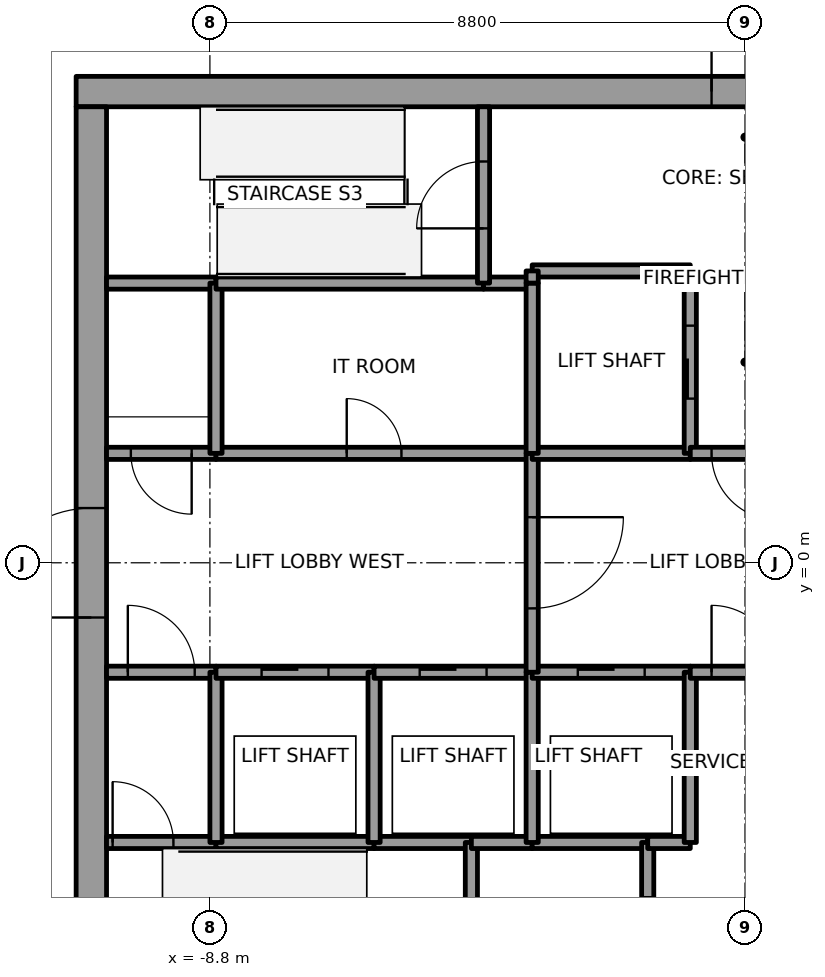
"""IFC4 building model, lengths in metres.
Left out: names, types, materials, properties, quantities, classifications, styles, units other than length and angle.
Written with IfcOpenShell. Run it as: python <this file> out.ifc"""

import sys

from ifc_helpers import new_model, si_unit, direction, frame, frame_2d, origin, place, context, subcontext, project, spatial, rectangle, extrude, element, fill, save


model = new_model("IFC4")
c1 = context("Model", 3, precision=1e-05, world=origin(), true_north=direction((0.0, 1.0)))
c2 = subcontext(c1, "Body", "Model", "MODEL_VIEW")
j1 = project(units=[si_unit("LENGTHUNIT", "METRE"), si_unit("PLANEANGLEUNIT", "RADIAN")], contexts=[c1])
p1 = place(None, origin())
s1 = spatial("IfcSite", under=j1, at=p1, CompositionType="ELEMENT")
p2 = place(p1, origin())
s2 = spatial("IfcBuilding", under=s1, at=p2, CompositionType="ELEMENT")
p3 = place(p2, frame((0.0, 0.0, 303.0)))
s3 = spatial("IfcBuildingStorey", under=s2, at=p3, CompositionType="ELEMENT", Elevation=303.0)
p4 = place(p3, frame((-11.0, 7.75, 0.0), z_axis=(0.0, 0.0, 1.0), x_axis=(1.0, 0.0, 0.0)))
e1 = element("IfcWall", 1, at=p4, inside=s3, PredefinedType="SHEAR", context=c2, shape_type="SweptSolid", body=[
    extrude(rectangle(XDim=22.0, YDim=0.5, at=frame_2d((11.0, 0.0))), origin(), (0.0, 0.0, 1.0), 4.0),
])
p5 = place(p4, frame((10.45, 0.0, 0.0)))
e2 = element("IfcOpeningElement", 2, at=p5, cuts=e1, PredefinedType="OPENING", context=c2, shape_type="SweptSolid", body=[
    extrude(rectangle(XDim=1.1, YDim=2.1, at=frame_2d((0.55, 1.05))), frame((0.0, 0.25, 0.0), z_axis=(0.0, -1.0, 0.0), x_axis=(1.0, 0.0, 0.0)), (0.0, 0.0, 1.0), 0.5),
])
p6 = place(p3, frame((-10.75, -7.5, 0.0), z_axis=(0.0, 0.0, 1.0), x_axis=(0.0, 1.0, 0.0)))
e3 = element("IfcWall", 3, at=p6, inside=s3, PredefinedType="SHEAR", context=c2, shape_type="SweptSolid", body=[
    extrude(rectangle(XDim=15.0, YDim=0.5, at=frame_2d((7.5, 0.0))), origin(), (0.0, 0.0, 1.0), 4.0),
])
p7 = place(p6, frame((6.6, 0.0, 0.0)))
e4 = element("IfcOpeningElement", 4, at=p7, cuts=e3, PredefinedType="OPENING", context=c2, shape_type="SweptSolid", body=[
    extrude(rectangle(XDim=1.8, YDim=2.1, at=frame_2d((0.9, 1.05))), frame((0.0, 0.25, 0.0), z_axis=(0.0, -1.0, 0.0), x_axis=(1.0, 0.0, 0.0)), (0.0, 0.0, 1.0), 0.5),
])
p8 = place(p3, frame((-10.5, -4.6, 0.0), z_axis=(0.0, 0.0, 1.0), x_axis=(1.0, 0.0, 0.0)))
e5 = element("IfcWall", 5, at=p8, inside=s3, PredefinedType="SOLIDWALL", context=c2, shape_type="SweptSolid", body=[
    extrude(rectangle(XDim=1.8, YDim=0.2, at=frame_2d((0.9, 0.0))), origin(), (0.0, 0.0, 1.0), 3.85),
])
p9 = place(p8, frame((0.1, 0.0, 0.0)))
e6 = element("IfcOpeningElement", 6, at=p9, cuts=e5, PredefinedType="OPENING", context=c2, shape_type="SweptSolid", body=[
    extrude(rectangle(XDim=1.0, YDim=2.1, at=frame_2d((0.5, 1.05))), frame((0.0, 0.1, 0.0), z_axis=(0.0, -1.0, 0.0), x_axis=(1.0, 0.0, 0.0)), (0.0, 0.0, 1.0), 0.2),
])
p10 = place(p3, frame((-10.5, -1.8, 0.0), z_axis=(0.0, 0.0, 1.0), x_axis=(1.0, 0.0, 0.0)))
e7 = element("IfcWall", 7, at=p10, inside=s3, PredefinedType="SOLIDWALL", context=c2, shape_type="SweptSolid", body=[
    extrude(rectangle(XDim=1.8, YDim=0.2, at=frame_2d((0.9, 0.0))), origin(), (0.0, 0.0, 1.0), 3.85),
])
p11 = place(p10, frame((0.35, 0.0, 0.0)))
e8 = element("IfcOpeningElement", 8, at=p11, cuts=e7, PredefinedType="OPENING", context=c2, shape_type="SweptSolid", body=[
    extrude(rectangle(XDim=1.1, YDim=2.1, at=frame_2d((0.55, 1.05))), frame((0.0, 0.1, 0.0), z_axis=(0.0, -1.0, 0.0), x_axis=(1.0, 0.0, 0.0)), (0.0, 0.0, 1.0), 0.2),
])
p12 = place(p3, frame((-8.7, 1.8, 0.0), z_axis=(0.0, 0.0, 1.0), x_axis=(-1.0, 0.0, 0.0)))
e9 = element("IfcWall", 9, at=p12, inside=s3, PredefinedType="SOLIDWALL", context=c2, shape_type="SweptSolid", body=[
    extrude(rectangle(XDim=1.8, YDim=0.2, at=frame_2d((0.9, 0.0))), origin(), (0.0, 0.0, 1.0), 3.85),
])
p13 = place(p12, frame((0.4, 0.0, 0.0)))
e10 = element("IfcOpeningElement", 10, at=p13, cuts=e9, PredefinedType="OPENING", context=c2, shape_type="SweptSolid", body=[
    extrude(rectangle(XDim=1.0, YDim=2.1, at=frame_2d((0.5, 1.05))), frame((0.0, 0.1, 0.0), z_axis=(0.0, -1.0, 0.0), x_axis=(1.0, 0.0, 0.0)), (0.0, 0.0, 1.0), 0.2),
])
p14 = place(p3, frame((-8.7, 4.6, 0.0), z_axis=(0.0, 0.0, 1.0), x_axis=(-1.0, 0.0, 0.0)))
e11 = element("IfcWall", 11, at=p14, inside=s3, PredefinedType="SOLIDWALL", context=c2, shape_type="SweptSolid", body=[
    extrude(rectangle(XDim=1.8, YDim=0.2, at=frame_2d((0.9, 0.0))), origin(), (0.0, 0.0, 1.0), 3.85),
])
p15 = place(p3, frame((-8.7, -4.6, 0.0), z_axis=(0.0, 0.0, 1.0), x_axis=(1.0, 0.0, 0.0)))
e12 = element("IfcWall", 12, at=p15, inside=s3, PredefinedType="SOLIDWALL", context=c2, shape_type="SweptSolid", body=[
    extrude(rectangle(XDim=2.6, YDim=0.2, at=frame_2d((1.3, 0.0))), origin(), (0.0, 0.0, 1.0), 3.85),
])
p16 = place(p3, frame((-8.7, -4.6, 0.0), z_axis=(0.0, 0.0, 1.0), x_axis=(0.0, 1.0, 0.0)))
e13 = element("IfcWall", 13, at=p16, inside=s3, PredefinedType="SOLIDWALL", context=c2, shape_type="SweptSolid", body=[
    extrude(rectangle(XDim=2.8, YDim=0.2, at=frame_2d((1.4, 0.0))), origin(), (0.0, 0.0, 1.0), 3.85),
])
p17 = place(p3, frame((-8.7, -1.8, 0.0), z_axis=(0.0, 0.0, 1.0), x_axis=(1.0, 0.0, 0.0)))
e14 = element("IfcWall", 14, at=p17, inside=s3, PredefinedType="SOLIDWALL", context=c2, shape_type="SweptSolid", body=[
    extrude(rectangle(XDim=2.6, YDim=0.2, at=frame_2d((1.3, 0.0))), origin(), (0.0, 0.0, 1.0), 3.85),
])
p18 = place(p17, frame((0.75, 0.0, 0.0)))
e15 = element("IfcOpeningElement", 15, at=p18, cuts=e14, PredefinedType="OPENING", context=c2, shape_type="SweptSolid", body=[
    extrude(rectangle(XDim=1.1, YDim=2.1, at=frame_2d((0.55, 1.05))), frame((0.0, 0.1, 0.0), z_axis=(0.0, -1.0, 0.0), x_axis=(1.0, 0.0, 0.0)), (0.0, 0.0, 1.0), 0.2),
])
p19 = place(p3, frame((-8.7, 1.8, 0.0), z_axis=(0.0, 0.0, 1.0), x_axis=(1.0, 0.0, 0.0)))
e16 = element("IfcWall", 16, at=p19, inside=s3, PredefinedType="SOLIDWALL", context=c2, shape_type="SweptSolid", body=[
    extrude(rectangle(XDim=5.2, YDim=0.2, at=frame_2d((2.6, 0.0))), origin(), (0.0, 0.0, 1.0), 3.85),
])
p20 = place(p19, frame((2.15, 0.0, 0.0)))
e17 = element("IfcOpeningElement", 17, at=p20, cuts=e16, PredefinedType="OPENING", context=c2, shape_type="SweptSolid", body=[
    extrude(rectangle(XDim=0.9, YDim=2.1, at=frame_2d((0.45, 1.05))), frame((0.0, 0.1, 0.0), z_axis=(0.0, -1.0, 0.0), x_axis=(1.0, 0.0, 0.0)), (0.0, 0.0, 1.0), 0.2),
])
p21 = place(p3, frame((-8.7, 4.6, 0.0), z_axis=(0.0, 0.0, 1.0), x_axis=(0.0, -1.0, 0.0)))
e18 = element("IfcWall", 18, at=p21, inside=s3, PredefinedType="SOLIDWALL", context=c2, shape_type="SweptSolid", body=[
    extrude(rectangle(XDim=2.8, YDim=0.2, at=frame_2d((1.4, 0.0))), origin(), (0.0, 0.0, 1.0), 3.85),
])
p22 = place(p3, frame((-4.3, 4.6, 0.0), z_axis=(0.0, 0.0, 1.0), x_axis=(-1.0, 0.0, 0.0)))
e19 = element("IfcWall", 19, at=p22, inside=s3, PredefinedType="SOLIDWALL", context=c2, shape_type="SweptSolid", body=[
    extrude(rectangle(XDim=4.4, YDim=0.2, at=frame_2d((2.2, 0.0))), origin(), (0.0, 0.0, 1.0), 3.85),
])
p23 = place(p3, frame((-6.1, -4.6, 0.0), z_axis=(0.0, 0.0, 1.0), x_axis=(1.0, 0.0, 0.0)))
e20 = element("IfcWall", 20, at=p23, inside=s3, PredefinedType="SOLIDWALL", context=c2, shape_type="SweptSolid", body=[
    extrude(rectangle(XDim=1.6, YDim=0.2, at=frame_2d((0.8, 0.0))), origin(), (0.0, 0.0, 1.0), 3.85),
])
p24 = place(p3, frame((-6.1, -4.6, 0.0), z_axis=(0.0, 0.0, 1.0), x_axis=(0.0, 1.0, 0.0)))
e21 = element("IfcWall", 21, at=p24, inside=s3, PredefinedType="SOLIDWALL", context=c2, shape_type="SweptSolid", body=[
    extrude(rectangle(XDim=2.8, YDim=0.2, at=frame_2d((1.4, 0.0))), origin(), (0.0, 0.0, 1.0), 3.85),
])
p25 = place(p3, frame((-6.1, -1.8, 0.0), z_axis=(0.0, 0.0, 1.0), x_axis=(1.0, 0.0, 0.0)))
e22 = element("IfcWall", 22, at=p25, inside=s3, PredefinedType="SOLIDWALL", context=c2, shape_type="SweptSolid", body=[
    extrude(rectangle(XDim=2.6, YDim=0.2, at=frame_2d((1.3, 0.0))), origin(), (0.0, 0.0, 1.0), 3.85),
])
p26 = place(p25, frame((0.75, 0.0, 0.0)))
e23 = element("IfcOpeningElement", 23, at=p26, cuts=e22, PredefinedType="OPENING", context=c2, shape_type="SweptSolid", body=[
    extrude(rectangle(XDim=1.1, YDim=2.1, at=frame_2d((0.55, 1.05))), frame((0.0, 0.1, 0.0), z_axis=(0.0, -1.0, 0.0), x_axis=(1.0, 0.0, 0.0)), (0.0, 0.0, 1.0), 0.2),
])
p27 = place(p3, frame((-4.5, -4.6, 0.0), z_axis=(0.0, 0.0, 1.0), x_axis=(0.0, -1.0, 0.0)))
e24 = element("IfcWall", 24, at=p27, inside=s3, PredefinedType="SOLIDWALL", context=c2, shape_type="SweptSolid", body=[
    extrude(rectangle(XDim=2.9, YDim=0.2, at=frame_2d((1.45, 0.0))), origin(), (0.0, 0.0, 1.0), 3.85),
])
p28 = place(p3, frame((-4.5, -4.6, 0.0), z_axis=(0.0, 0.0, 1.0), x_axis=(1.0, 0.0, 0.0)))
e25 = element("IfcWall", 25, at=p28, inside=s3, PredefinedType="SOLIDWALL", context=c2, shape_type="SweptSolid", body=[
    extrude(rectangle(XDim=1.0, YDim=0.2, at=frame_2d((0.5, 0.0))), origin(), (0.0, 0.0, 1.0), 3.85),
])
p29 = place(p3, frame((-3.5, 4.6, 0.0), z_axis=(0.0, 0.0, 1.0), x_axis=(-1.0, 0.0, 0.0)))
e26 = element("IfcWall", 26, at=p29, inside=s3, PredefinedType="SOLIDWALL", context=c2, shape_type="SweptSolid", body=[
    extrude(rectangle(XDim=0.8, YDim=0.2, at=frame_2d((0.4, 0.0))), origin(), (0.0, 0.0, 1.0), 3.85),
])
p30 = place(p3, frame((-4.3, 4.6, 0.0), z_axis=(0.0, 0.0, 1.0), x_axis=(0.0, 1.0, 0.0)))
e27 = element("IfcWall", 27, at=p30, inside=s3, PredefinedType="SOLIDWALL", context=c2, shape_type="SweptSolid", body=[
    extrude(rectangle(XDim=2.9, YDim=0.2, at=frame_2d((1.45, 0.0))), origin(), (0.0, 0.0, 1.0), 3.85),
])
p31 = place(p30, frame((0.9, 0.0, 0.0)))
e28 = element("IfcOpeningElement", 28, at=p31, cuts=e27, PredefinedType="OPENING", context=c2, shape_type="SweptSolid", body=[
    extrude(rectangle(XDim=1.1, YDim=2.1, at=frame_2d((0.55, 1.05))), frame((0.0, 0.1, 0.0), z_axis=(0.0, -1.0, 0.0), x_axis=(1.0, 0.0, 0.0)), (0.0, 0.0, 1.0), 0.2),
])
p32 = place(p3, frame((-3.5, -4.6, 0.0), z_axis=(0.0, 0.0, 1.0), x_axis=(1.0, 0.0, 0.0)))
e29 = element("IfcWall", 29, at=p32, inside=s3, PredefinedType="SOLIDWALL", context=c2, shape_type="SweptSolid", body=[
    extrude(rectangle(XDim=1.9, YDim=0.2, at=frame_2d((0.95, 0.0))), origin(), (0.0, 0.0, 1.0), 3.85),
])
p33 = place(p3, frame((-3.5, -4.6, 0.0), z_axis=(0.0, 0.0, 1.0), x_axis=(0.0, 1.0, 0.0)))
e30 = element("IfcWall", 30, at=p33, inside=s3, PredefinedType="SOLIDWALL", context=c2, shape_type="SweptSolid", body=[
    extrude(rectangle(XDim=2.8, YDim=0.2, at=frame_2d((1.4, 0.0))), origin(), (0.0, 0.0, 1.0), 3.85),
])
p34 = place(p3, frame((-3.5, -1.8, 0.0), z_axis=(0.0, 0.0, 1.0), x_axis=(1.0, 0.0, 0.0)))
e31 = element("IfcWall", 31, at=p34, inside=s3, PredefinedType="SOLIDWALL", context=c2, shape_type="SweptSolid", body=[
    extrude(rectangle(XDim=2.6, YDim=0.2, at=frame_2d((1.3, 0.0))), origin(), (0.0, 0.0, 1.0), 3.85),
])
p35 = place(p34, frame((0.75, 0.0, 0.0)))
e32 = element("IfcOpeningElement", 32, at=p35, cuts=e31, PredefinedType="OPENING", context=c2, shape_type="SweptSolid", body=[
    extrude(rectangle(XDim=1.1, YDim=2.1, at=frame_2d((0.55, 1.05))), frame((0.0, 0.1, 0.0), z_axis=(0.0, -1.0, 0.0), x_axis=(1.0, 0.0, 0.0)), (0.0, 0.0, 1.0), 0.2),
])
p36 = place(p3, frame((-3.5, 1.8, 0.0), z_axis=(0.0, 0.0, 1.0), x_axis=(0.0, -1.0, 0.0)))
e33 = element("IfcWall", 33, at=p36, inside=s3, PredefinedType="SOLIDWALL", context=c2, shape_type="SweptSolid", body=[
    extrude(rectangle(XDim=3.6, YDim=0.2, at=frame_2d((1.8, 0.0))), origin(), (0.0, 0.0, 1.0), 3.85),
])
p37 = place(p36, frame((1.05, 0.0, 0.0)))
e34 = element("IfcOpeningElement", 34, at=p37, cuts=e33, PredefinedType="OPENING", context=c2, shape_type="SweptSolid", body=[
    extrude(rectangle(XDim=1.5, YDim=2.1, at=frame_2d((0.75, 1.05))), frame((0.0, 0.1, 0.0), z_axis=(0.0, -1.0, 0.0), x_axis=(1.0, 0.0, 0.0)), (0.0, 0.0, 1.0), 0.2),
])
p38 = place(p3, frame((-0.9, 1.8, 0.0), z_axis=(0.0, 0.0, 1.0), x_axis=(-1.0, 0.0, 0.0)))
e35 = element("IfcWall", 35, at=p38, inside=s3, PredefinedType="SOLIDWALL", context=c2, shape_type="SweptSolid", body=[
    extrude(rectangle(XDim=2.6, YDim=0.2, at=frame_2d((1.3, 0.0))), origin(), (0.0, 0.0, 1.0), 3.85),
])
p39 = place(p3, frame((-3.5, 1.8, 0.0), z_axis=(0.0, 0.0, 1.0), x_axis=(0.0, 1.0, 0.0)))
e36 = element("IfcWall", 36, at=p39, inside=s3, PredefinedType="SOLIDWALL", context=c2, shape_type="SweptSolid", body=[
    extrude(rectangle(XDim=2.8, YDim=0.2, at=frame_2d((1.4, 0.0))), origin(), (0.0, 0.0, 1.0), 3.85),
])
p40 = place(p3, frame((-0.9, 1.8, 0.0), z_axis=(0.0, 0.0, 1.0), x_axis=(0.0, 1.0, 0.0)))
e37 = element("IfcWall", 37, at=p40, inside=s3, PredefinedType="SOLIDWALL", context=c2, shape_type="SweptSolid", body=[
    extrude(rectangle(XDim=3.0, YDim=0.2, at=frame_2d((1.5, 0.0))), origin(), (0.0, 0.0, 1.0), 3.85),
])
p41 = place(p40, frame((0.9, 0.0, 0.0)))
e38 = element("IfcOpeningElement", 38, at=p41, cuts=e37, PredefinedType="OPENING", context=c2, shape_type="SweptSolid", body=[
    extrude(rectangle(XDim=1.2, YDim=2.1, at=frame_2d((0.6, 1.05))), frame((0.0, 0.1, 0.0), z_axis=(0.0, -1.0, 0.0), x_axis=(1.0, 0.0, 0.0)), (0.0, 0.0, 1.0), 0.2),
])
p42 = place(p3, frame((-0.9, 4.8, 0.0), z_axis=(0.0, 0.0, 1.0), x_axis=(-1.0, 0.0, 0.0)))
e39 = element("IfcWall", 39, at=p42, inside=s3, PredefinedType="SOLIDWALL", context=c2, shape_type="SweptSolid", body=[
    extrude(rectangle(XDim=2.6, YDim=0.2, at=frame_2d((1.3, 0.0))), origin(), (0.0, 0.0, 1.0), 3.85),
])
p43 = place(p3, frame((-3.5, 4.8, 0.0), z_axis=(0.0, 0.0, 1.0), x_axis=(0.0, -1.0, 0.0)))
e40 = element("IfcWall", 40, at=p43, inside=s3, PredefinedType="SOLIDWALL", context=c2, shape_type="SweptSolid", body=[
    extrude(rectangle(XDim=0.2, YDim=0.2, at=frame_2d((0.1, 0.0))), origin(), (0.0, 0.0, 1.0), 3.85),
])
p44 = place(p3, frame((-1.6, -7.5, 0.0), z_axis=(0.0, 0.0, 1.0), x_axis=(0.0, 1.0, 0.0)))
e41 = element("IfcWall", 41, at=p44, inside=s3, PredefinedType="SOLIDWALL", context=c2, shape_type="SweptSolid", body=[
    extrude(rectangle(XDim=2.9, YDim=0.2, at=frame_2d((1.45, 0.0))), origin(), (0.0, 0.0, 1.0), 3.85),
])
p45 = place(p44, frame((0.9, 0.0, 0.0)))
e42 = element("IfcOpeningElement", 42, at=p45, cuts=e41, PredefinedType="OPENING", context=c2, shape_type="SweptSolid", body=[
    extrude(rectangle(XDim=1.1, YDim=2.1, at=frame_2d((0.55, 1.05))), frame((0.0, 0.1, 0.0), z_axis=(0.0, -1.0, 0.0), x_axis=(1.0, 0.0, 0.0)), (0.0, 0.0, 1.0), 0.2),
])
p46 = place(p3, frame((-1.6, -4.6, 0.0), z_axis=(0.0, 0.0, 1.0), x_axis=(1.0, 0.0, 0.0)))
e43 = element("IfcWall", 43, at=p46, inside=s3, PredefinedType="SOLIDWALL", context=c2, shape_type="SweptSolid", body=[
    extrude(rectangle(XDim=0.7, YDim=0.2, at=frame_2d((0.35, 0.0))), origin(), (0.0, 0.0, 1.0), 3.85),
])
p47 = place(p3, frame((-0.9, -4.6, 0.0), z_axis=(0.0, 0.0, 1.0), x_axis=(0.0, 1.0, 0.0)))
e44 = element("IfcWall", 44, at=p47, inside=s3, PredefinedType="SOLIDWALL", context=c2, shape_type="SweptSolid", body=[
    extrude(rectangle(XDim=2.8, YDim=0.2, at=frame_2d((1.4, 0.0))), origin(), (0.0, 0.0, 1.0), 3.85),
])
p48 = place(p3, frame((-0.9, -1.8, 0.0), z_axis=(0.0, 0.0, 1.0), x_axis=(1.0, 0.0, 0.0)))
e45 = element("IfcWall", 45, at=p48, inside=s3, PredefinedType="SOLIDWALL", context=c2, shape_type="SweptSolid", body=[
    extrude(rectangle(XDim=1.8, YDim=0.2, at=frame_2d((0.9, 0.0))), origin(), (0.0, 0.0, 1.0), 3.85),
])
p49 = place(p48, frame((0.35, 0.0, 0.0)))
e46 = element("IfcOpeningElement", 46, at=p49, cuts=e45, PredefinedType="OPENING", context=c2, shape_type="SweptSolid", body=[
    extrude(rectangle(XDim=1.1, YDim=2.1, at=frame_2d((0.55, 1.05))), frame((0.0, 0.1, 0.0), z_axis=(0.0, -1.0, 0.0), x_axis=(1.0, 0.0, 0.0)), (0.0, 0.0, 1.0), 0.2),
])
p50 = place(p3, frame((0.9, 1.8, 0.0), z_axis=(0.0, 0.0, 1.0), x_axis=(-1.0, 0.0, 0.0)))
e47 = element("IfcWall", 47, at=p50, inside=s3, PredefinedType="SOLIDWALL", context=c2, shape_type="SweptSolid", body=[
    extrude(rectangle(XDim=1.8, YDim=0.2, at=frame_2d((0.9, 0.0))), origin(), (0.0, 0.0, 1.0), 3.85),
])
p51 = place(p50, frame((0.35, 0.0, 0.0)))
e48 = element("IfcOpeningElement", 48, at=p51, cuts=e47, PredefinedType="OPENING", context=c2, shape_type="SweptSolid", body=[
    extrude(rectangle(XDim=1.1, YDim=2.1, at=frame_2d((0.55, 1.05))), frame((0.0, 0.1, 0.0), z_axis=(0.0, -1.0, 0.0), x_axis=(1.0, 0.0, 0.0)), (0.0, 0.0, 1.0), 0.2),
])
p52 = place(p18, origin())
e49 = element("IfcDoor", 49, at=p52, inside=s3, OperationType="SLIDING_TO_LEFT", PredefinedType="DOOR", context=c2, shape_type="SweptSolid", body=[
    extrude(rectangle(XDim=1.1, YDim=2.1, at=frame_2d((0.55, 1.05))), frame((0.0, 0.025, 0.0), z_axis=(0.0, -1.0, 0.0), x_axis=(1.0, 0.0, 0.0)), (0.0, 0.0, 1.0), 0.05),
])
fill(e15, e49)
p53 = place(p26, origin())
e50 = element("IfcDoor", 50, at=p53, inside=s3, OperationType="SLIDING_TO_RIGHT", PredefinedType="DOOR", context=c2, shape_type="SweptSolid", body=[
    extrude(rectangle(XDim=1.1, YDim=2.1, at=frame_2d((0.55, 1.05))), frame((0.0, 0.025, 0.0), z_axis=(0.0, -1.0, 0.0), x_axis=(1.0, 0.0, 0.0)), (0.0, 0.0, 1.0), 0.05),
])
fill(e23, e50)
p54 = place(p35, origin())
e51 = element("IfcDoor", 51, at=p54, inside=s3, OperationType="SLIDING_TO_LEFT", PredefinedType="DOOR", context=c2, shape_type="SweptSolid", body=[
    extrude(rectangle(XDim=1.1, YDim=2.1, at=frame_2d((0.55, 1.05))), frame((0.0, 0.025, 0.0), z_axis=(0.0, -1.0, 0.0), x_axis=(1.0, 0.0, 0.0)), (0.0, 0.0, 1.0), 0.05),
])
fill(e32, e51)
p55 = place(p41, origin())
e52 = element("IfcDoor", 52, at=p55, inside=s3, OperationType="SLIDING_TO_LEFT", PredefinedType="DOOR", context=c2, shape_type="SweptSolid", body=[
    extrude(rectangle(XDim=1.2, YDim=2.1, at=frame_2d((0.6, 1.05))), frame((0.0, 0.025, 0.0), z_axis=(0.0, -1.0, 0.0), x_axis=(1.0, 0.0, 0.0)), (0.0, 0.0, 1.0), 0.05),
])
fill(e38, e52)
p56 = place(p37, origin())
e53 = element("IfcDoor", 53, at=p56, inside=s3, OperationType="DOUBLE_DOOR_SINGLE_SWING", PredefinedType="DOOR", context=c2, shape_type="SweptSolid", body=[
    extrude(rectangle(XDim=1.5, YDim=2.1, at=frame_2d((0.75, 1.05))), frame((0.0, 0.025, 0.0), z_axis=(0.0, -1.0, 0.0), x_axis=(1.0, 0.0, 0.0)), (0.0, 0.0, 1.0), 0.05),
])
fill(e34, e53)
p57 = place(p11, origin())
e54 = element("IfcDoor", 54, at=p57, inside=s3, OperationType="SINGLE_SWING_LEFT", PredefinedType="DOOR", context=c2, shape_type="SweptSolid", body=[
    extrude(rectangle(XDim=1.1, YDim=2.1, at=frame_2d((0.55, 1.05))), frame((0.0, 0.025, 0.0), z_axis=(0.0, -1.0, 0.0), x_axis=(1.0, 0.0, 0.0)), (0.0, 0.0, 1.0), 0.05),
])
fill(e8, e54)
p58 = place(p51, origin())
e55 = element("IfcDoor", 55, at=p58, inside=s3, OperationType="SINGLE_SWING_LEFT", PredefinedType="DOOR", context=c2, shape_type="SweptSolid", body=[
    extrude(rectangle(XDim=1.1, YDim=2.1, at=frame_2d((0.55, 1.05))), frame((0.0, 0.025, 0.0), z_axis=(0.0, -1.0, 0.0), x_axis=(1.0, 0.0, 0.0)), (0.0, 0.0, 1.0), 0.05),
])
fill(e48, e55)
p59 = place(p49, origin())
e56 = element("IfcDoor", 56, at=p59, inside=s3, OperationType="SINGLE_SWING_LEFT", PredefinedType="DOOR", context=c2, shape_type="SweptSolid", body=[
    extrude(rectangle(XDim=1.1, YDim=2.1, at=frame_2d((0.55, 1.05))), frame((0.0, 0.025, 0.0), z_axis=(0.0, -1.0, 0.0), x_axis=(1.0, 0.0, 0.0)), (0.0, 0.0, 1.0), 0.05),
])
fill(e46, e56)
p60 = place(p13, origin())
e57 = element("IfcDoor", 57, at=p60, inside=s3, OperationType="SINGLE_SWING_RIGHT", PredefinedType="DOOR", context=c2, shape_type="SweptSolid", body=[
    extrude(rectangle(XDim=1.0, YDim=2.1, at=frame_2d((0.5, 1.05))), frame((0.0, 0.025, 0.0), z_axis=(0.0, -1.0, 0.0), x_axis=(1.0, 0.0, 0.0)), (0.0, 0.0, 1.0), 0.05),
])
fill(e10, e57)
p61 = place(p9, origin())
e58 = element("IfcDoor", 58, at=p61, inside=s3, OperationType="SINGLE_SWING_LEFT", PredefinedType="DOOR", context=c2, shape_type="SweptSolid", body=[
    extrude(rectangle(XDim=1.0, YDim=2.1, at=frame_2d((0.5, 1.05))), frame((0.0, 0.025, 0.0), z_axis=(0.0, -1.0, 0.0), x_axis=(1.0, 0.0, 0.0)), (0.0, 0.0, 1.0), 0.05),
])
fill(e6, e58)
p62 = place(p31, origin())
e59 = element("IfcDoor", 59, at=p62, inside=s3, OperationType="SINGLE_SWING_LEFT", PredefinedType="DOOR", context=c2, shape_type="SweptSolid", body=[
    extrude(rectangle(XDim=1.1, YDim=2.1, at=frame_2d((0.55, 1.05))), frame((0.0, 0.025, 0.0), z_axis=(0.0, -1.0, 0.0), x_axis=(1.0, 0.0, 0.0)), (0.0, 0.0, 1.0), 0.05),
])
fill(e28, e59)
p63 = place(p20, origin())
e60 = element("IfcDoor", 60, at=p63, inside=s3, OperationType="SINGLE_SWING_LEFT", PredefinedType="DOOR", context=c2, shape_type="SweptSolid", body=[
    extrude(rectangle(XDim=0.9, YDim=2.1, at=frame_2d((0.45, 1.05))), frame((0.0, 0.025, 0.0), z_axis=(0.0, -1.0, 0.0), x_axis=(1.0, 0.0, 0.0)), (0.0, 0.0, 1.0), 0.05),
])
fill(e17, e60)
p64 = place(p7, origin())
e61 = element("IfcDoor", 61, at=p64, inside=s3, OperationType="DOUBLE_DOOR_SINGLE_SWING", PredefinedType="DOOR", context=c2, shape_type="SweptSolid", body=[
    extrude(rectangle(XDim=1.8, YDim=2.1, at=frame_2d((0.9, 1.05))), frame((0.0, 0.025, 0.0), z_axis=(0.0, -1.0, 0.0), x_axis=(1.0, 0.0, 0.0)), (0.0, 0.0, 1.0), 0.05),
])
fill(e4, e61)
p65 = place(p5, origin())
e62 = element("IfcDoor", 62, at=p65, inside=s3, OperationType="SINGLE_SWING_LEFT", PredefinedType="DOOR", context=c2, shape_type="SweptSolid", body=[
    extrude(rectangle(XDim=1.1, YDim=2.1, at=frame_2d((0.55, 1.05))), frame((0.0, 0.025, 0.0), z_axis=(0.0, -1.0, 0.0), x_axis=(1.0, 0.0, 0.0)), (0.0, 0.0, 1.0), 0.05),
])
fill(e2, e62)
save(model, sys.argv[1])
